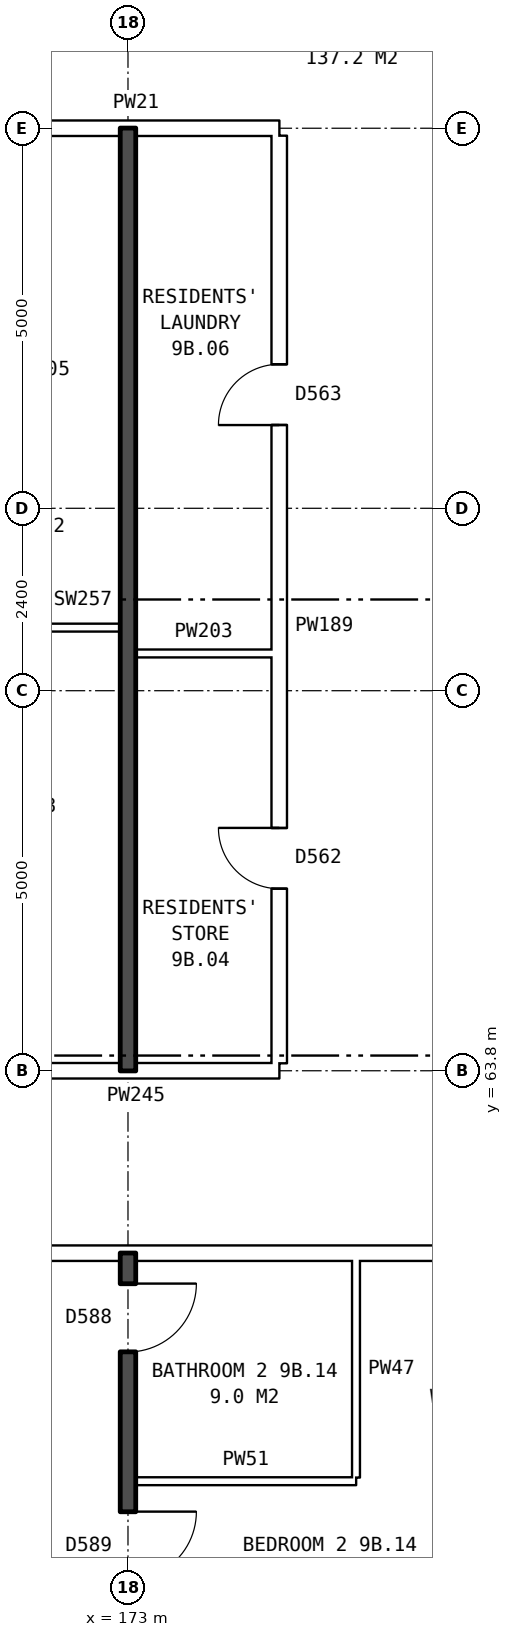
"""IFC4 building model, lengths in metres.
Left out: names, types, materials, properties, quantities, classifications, styles, units other than length and angle.
Written with IfcOpenShell. Run it as: python <this file> out.ifc"""

import sys

from ifc_helpers import new_model, si_unit, direction, frame, frame_2d, origin, place, context, subcontext, project, spatial, rectangle, extrude, element, fill, save


model = new_model("IFC4")
c1 = context("Model", 3, precision=1e-05, world=origin(), true_north=direction((0.0, 1.0)))
c2 = subcontext(c1, "Body", "Model", "MODEL_VIEW")
j1 = project(units=[si_unit("LENGTHUNIT", "METRE"), si_unit("PLANEANGLEUNIT", "RADIAN")], contexts=[c1])
p1 = place(None, origin())
s1 = spatial("IfcSite", under=j1, at=p1, CompositionType="ELEMENT")
p2 = place(p1, origin())
s2 = spatial("IfcBuilding", under=s1, at=p2, CompositionType="ELEMENT")
p3 = place(p2, frame((0.0, 0.0, 35.0)))
s3 = spatial("IfcBuildingStorey", under=s2, at=p3, CompositionType="ELEMENT", Elevation=35.0)
p4 = place(p3, frame((173.1, 58.4, 0.0), z_axis=(0.0, 0.0, 1.0), x_axis=(1.0, 0.0, 0.0)))
e1 = element("IfcWall", 1, at=p4, inside=s3, PredefinedType="PARTITIONING", context=c2, shape_type="SweptSolid", body=[
    extrude(rectangle(XDim=2.9, YDim=0.1, at=frame_2d((1.45, 0.0))), origin(), (0.0, 0.0, 1.0), 2.85),
])
p5 = place(p3, frame((155.1, 61.4, 0.0), z_axis=(0.0, 0.0, 1.0), x_axis=(1.0, 0.0, 0.0)))
e2 = element("IfcWall", 2, at=p5, inside=s3, PredefinedType="PARTITIONING", context=c2, shape_type="SweptSolid", body=[
    extrude(rectangle(XDim=22.29, YDim=0.2, at=frame_2d((11.145, 0.0))), origin(), (0.0, 0.0, 1.0), 2.85),
])
p6 = place(p5, frame((2.45, 0.0, 0.0)))
e3 = element("IfcOpeningElement", 3, at=p6, cuts=e2, PredefinedType="OPENING", context=c2, shape_type="SweptSolid", body=[
    extrude(rectangle(XDim=1.0, YDim=2.1, at=frame_2d((0.5, 1.05))), frame((0.0, 0.11, 0.0), z_axis=(0.0, -1.0, 0.0), x_axis=(1.0, 0.0, 0.0)), (0.0, 0.0, 1.0), 0.22),
])
p7 = place(p5, frame((14.4, 0.0, 0.0)))
e4 = element("IfcOpeningElement", 4, at=p7, cuts=e2, PredefinedType="OPENING", context=c2, shape_type="SweptSolid", body=[
    extrude(rectangle(XDim=1.0, YDim=2.1, at=frame_2d((0.5, 1.05))), frame((0.0, 0.11, 0.0), z_axis=(0.0, -1.0, 0.0), x_axis=(1.0, 0.0, 0.0)), (0.0, 0.0, 1.0), 0.22),
])
p8 = place(p3, frame((168.64, 63.8, 0.0), z_axis=(0.0, 0.0, 1.0), x_axis=(1.0, 0.0, 0.0)))
e5 = element("IfcWall", 5, at=p8, inside=s3, PredefinedType="PARTITIONING", context=c2, shape_type="SweptSolid", body=[
    extrude(rectangle(XDim=6.35, YDim=0.2, at=frame_2d((3.175, 0.0))), origin(), (0.0, 0.0, 1.0), 2.85),
])
p9 = place(p8, frame((1.78, 0.0, 0.0)))
e6 = element("IfcOpeningElement", 6, at=p9, cuts=e5, PredefinedType="OPENING", context=c2, shape_type="SweptSolid", body=[
    extrude(rectangle(XDim=0.8, YDim=2.1, at=frame_2d((0.4, 1.05))), frame((0.0, 0.11, 0.0), z_axis=(0.0, -1.0, 0.0), x_axis=(1.0, 0.0, 0.0)), (0.0, 0.0, 1.0), 0.22),
])
p10 = place(p3, frame((173.1, 69.29, 0.0), z_axis=(0.0, 0.0, 1.0), x_axis=(1.0, 0.0, 0.0)))
e7 = element("IfcWall", 7, at=p10, inside=s3, PredefinedType="PARTITIONING", context=c2, shape_type="SweptSolid", body=[
    extrude(rectangle(XDim=1.79, YDim=0.1, at=frame_2d((0.895, 0.0))), origin(), (0.0, 0.0, 1.0), 2.85),
])
p11 = place(p3, frame((168.64, 69.63, 0.0), z_axis=(0.0, 0.0, 1.0), x_axis=(1.0, 0.0, 0.0)))
e8 = element("IfcWall", 8, at=p11, inside=s3, PredefinedType="PARTITIONING", context=c2, shape_type="SweptSolid", body=[
    extrude(rectangle(XDim=4.26, YDim=0.1, at=frame_2d((2.13, 0.0))), origin(), (0.0, 0.0, 1.0), 2.85),
])
p12 = place(p3, frame((168.64, 76.2, 0.0), z_axis=(0.0, 0.0, 1.0), x_axis=(1.0, 0.0, 0.0)))
e9 = element("IfcWall", 9, at=p12, inside=s3, PredefinedType="PARTITIONING", context=c2, shape_type="SweptSolid", body=[
    extrude(rectangle(XDim=6.35, YDim=0.2, at=frame_2d((3.175, 0.0))), origin(), (0.0, 0.0, 1.0), 2.85),
])
p13 = place(p12, frame((1.78, 0.0, 0.0)))
e10 = element("IfcOpeningElement", 10, at=p13, cuts=e9, PredefinedType="OPENING", context=c2, shape_type="SweptSolid", body=[
    extrude(rectangle(XDim=0.8, YDim=2.1, at=frame_2d((0.4, 1.05))), frame((0.0, 0.11, 0.0), z_axis=(0.0, -1.0, 0.0), x_axis=(1.0, 0.0, 0.0)), (0.0, 0.0, 1.0), 0.22),
])
p14 = place(p3, frame((173.0, 54.36, 0.0), z_axis=(0.0, 0.0, 1.0), x_axis=(0.0, 1.0, 0.0)))
e11 = element("IfcWall", 11, at=p14, inside=s3, PredefinedType="SOLIDWALL", context=c2, shape_type="SweptSolid", body=[
    extrude(rectangle(XDim=7.04, YDim=0.2, at=frame_2d((3.52, 0.0))), origin(), (0.0, 0.0, 1.0), 2.85),
])
p15 = place(p14, frame((2.74, 0.0, 0.0)))
e12 = element("IfcOpeningElement", 12, at=p15, cuts=e11, PredefinedType="OPENING", context=c2, shape_type="SweptSolid", body=[
    extrude(rectangle(XDim=0.9, YDim=2.1, at=frame_2d((0.45, 1.05))), frame((0.0, 0.11, 0.0), z_axis=(0.0, -1.0, 0.0), x_axis=(1.0, 0.0, 0.0)), (0.0, 0.0, 1.0), 0.22),
])
p16 = place(p14, frame((5.74, 0.0, 0.0)))
e13 = element("IfcOpeningElement", 13, at=p16, cuts=e11, PredefinedType="OPENING", context=c2, shape_type="SweptSolid", body=[
    extrude(rectangle(XDim=0.9, YDim=2.1, at=frame_2d((0.45, 1.05))), frame((0.0, 0.11, 0.0), z_axis=(0.0, -1.0, 0.0), x_axis=(1.0, 0.0, 0.0)), (0.0, 0.0, 1.0), 0.22),
])
p17 = place(p3, frame((173.0, 63.8, 0.0), z_axis=(0.0, 0.0, 1.0), x_axis=(0.0, 1.0, 0.0)))
e14 = element("IfcWall", 14, at=p17, inside=s3, PredefinedType="SOLIDWALL", context=c2, shape_type="SweptSolid", body=[
    extrude(rectangle(XDim=12.4, YDim=0.2, at=frame_2d((6.2, 0.0))), origin(), (0.0, 0.0, 1.0), 2.85),
])
p18 = place(p3, frame((174.99, 63.9, 0.0), z_axis=(0.0, 0.0, 1.0), x_axis=(0.0, 1.0, 0.0)))
e15 = element("IfcWall", 15, at=p18, inside=s3, PredefinedType="PARTITIONING", context=c2, shape_type="SweptSolid", body=[
    extrude(rectangle(XDim=12.2, YDim=0.2, at=frame_2d((6.1, 0.0))), origin(), (0.0, 0.0, 1.0), 2.85),
])
p19 = place(p18, frame((2.295, 0.0, 0.0)))
e16 = element("IfcOpeningElement", 16, at=p19, cuts=e15, PredefinedType="OPENING", context=c2, shape_type="SweptSolid", body=[
    extrude(rectangle(XDim=0.8, YDim=2.1, at=frame_2d((0.4, 1.05))), frame((0.0, 0.11, 0.0), z_axis=(0.0, -1.0, 0.0), x_axis=(1.0, 0.0, 0.0)), (0.0, 0.0, 1.0), 0.22),
])
p20 = place(p18, frame((8.395, 0.0, 0.0)))
e17 = element("IfcOpeningElement", 17, at=p20, cuts=e15, PredefinedType="OPENING", context=c2, shape_type="SweptSolid", body=[
    extrude(rectangle(XDim=0.8, YDim=2.1, at=frame_2d((0.4, 1.05))), frame((0.0, 0.11, 0.0), z_axis=(0.0, -1.0, 0.0), x_axis=(1.0, 0.0, 0.0)), (0.0, 0.0, 1.0), 0.22),
])
p21 = place(p3, frame((176.0, 58.45, 0.0), z_axis=(0.0, 0.0, 1.0), x_axis=(0.0, 1.0, 0.0)))
e18 = element("IfcWall", 18, at=p21, inside=s3, PredefinedType="PARTITIONING", context=c2, shape_type="SweptSolid", body=[
    extrude(rectangle(XDim=2.85, YDim=0.1, at=frame_2d((1.425, 0.0))), origin(), (0.0, 0.0, 1.0), 2.85),
])
p22 = place(p19, origin())
e19 = element("IfcDoor", 19, at=p22, inside=s3, OperationType="SINGLE_SWING_RIGHT", PredefinedType="DOOR", context=c2, shape_type="SweptSolid", body=[
    extrude(rectangle(XDim=0.8, YDim=2.1, at=frame_2d((0.4, 1.05))), frame((0.0, 0.025, 0.0), z_axis=(0.0, -1.0, 0.0), x_axis=(1.0, 0.0, 0.0)), (0.0, 0.0, 1.0), 0.05),
])
fill(e16, e19)
p23 = place(p20, origin())
e20 = element("IfcDoor", 20, at=p23, inside=s3, OperationType="SINGLE_SWING_LEFT", PredefinedType="DOOR", context=c2, shape_type="SweptSolid", body=[
    extrude(rectangle(XDim=0.8, YDim=2.1, at=frame_2d((0.4, 1.05))), frame((0.0, 0.025, 0.0), z_axis=(0.0, -1.0, 0.0), x_axis=(1.0, 0.0, 0.0)), (0.0, 0.0, 1.0), 0.05),
])
fill(e17, e20)
p24 = place(p15, frame((0.9, 0.0, 0.0), z_axis=(0.0, 0.0, 1.0), x_axis=(-1.0, 0.0, 0.0)))
e21 = element("IfcDoor", 21, at=p24, inside=s3, OperationType="SINGLE_SWING_LEFT", PredefinedType="DOOR", context=c2, shape_type="SweptSolid", body=[
    extrude(rectangle(XDim=0.9, YDim=2.1, at=frame_2d((0.45, 1.05))), frame((0.0, 0.025, 0.0), z_axis=(0.0, -1.0, 0.0), x_axis=(1.0, 0.0, 0.0)), (0.0, 0.0, 1.0), 0.05),
])
fill(e12, e21)
p25 = place(p16, frame((0.9, 0.0, 0.0), z_axis=(0.0, 0.0, 1.0), x_axis=(-1.0, 0.0, 0.0)))
e22 = element("IfcDoor", 22, at=p25, inside=s3, OperationType="SINGLE_SWING_LEFT", PredefinedType="DOOR", context=c2, shape_type="SweptSolid", body=[
    extrude(rectangle(XDim=0.9, YDim=2.1, at=frame_2d((0.45, 1.05))), frame((0.0, 0.025, 0.0), z_axis=(0.0, -1.0, 0.0), x_axis=(1.0, 0.0, 0.0)), (0.0, 0.0, 1.0), 0.05),
])
fill(e13, e22)
save(model, sys.argv[1])
